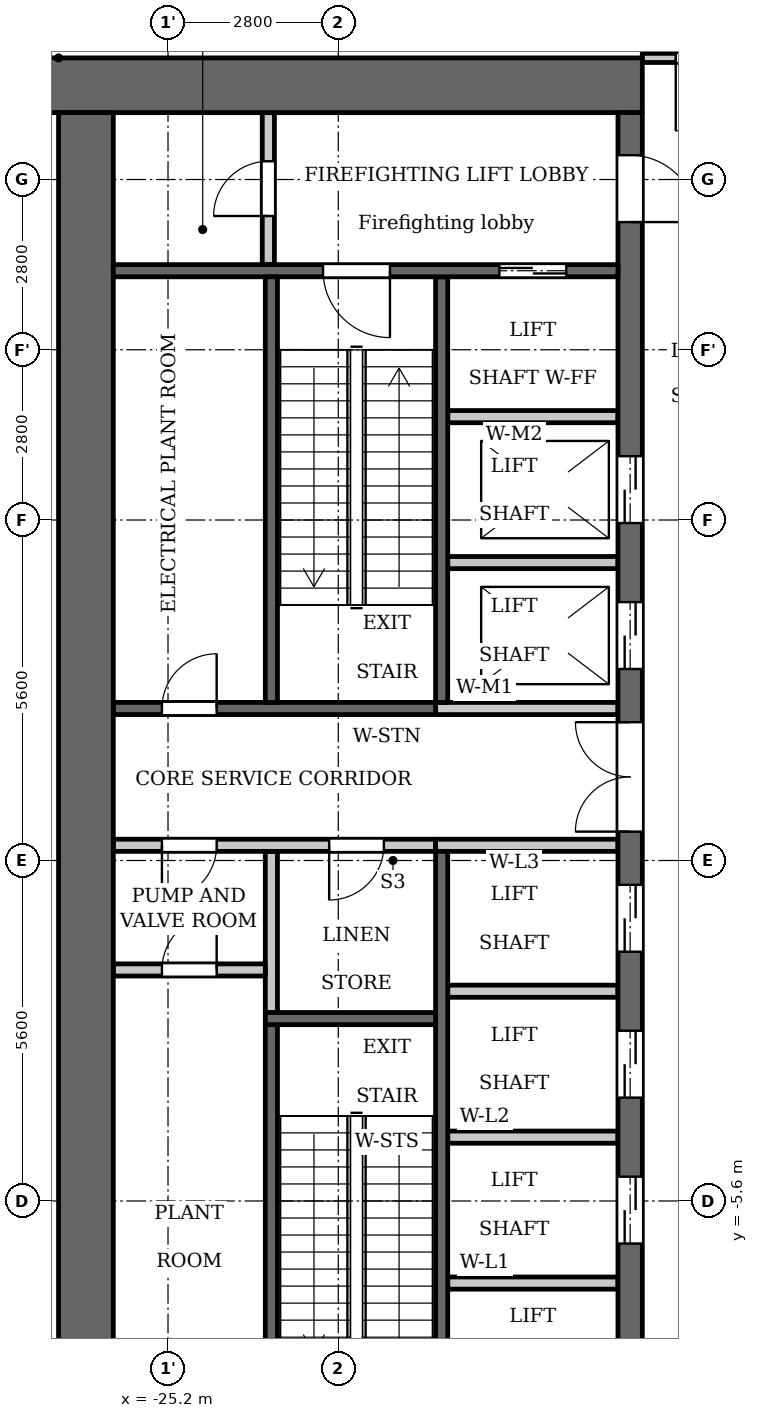
"""IFC4 building model, lengths in metres.
Left out: names, types, materials, properties, quantities, classifications, styles, units other than length and angle.
Written with IfcOpenShell. Run it as: python <this file> out.ifc"""

import sys

from ifc_helpers import new_model, si_unit, direction, frame, frame_2d, origin, place, context, subcontext, project, spatial, rectangle, extrude, element, fill, save


model = new_model("IFC4")
c1 = context("Model", 3, precision=1e-05, world=origin(), true_north=direction((0.0, 1.0)))
c2 = subcontext(c1, "Body", "Model", "MODEL_VIEW")
j1 = project(units=[si_unit("LENGTHUNIT", "METRE"), si_unit("PLANEANGLEUNIT", "RADIAN")], contexts=[c1])
p1 = place(None, origin())
s1 = spatial("IfcSite", under=j1, at=p1, CompositionType="ELEMENT")
p2 = place(p1, origin())
s2 = spatial("IfcBuilding", under=s1, at=p2, CompositionType="ELEMENT")
p3 = place(p2, frame((0.0, 0.0, 125.3)))
s3 = spatial("IfcBuildingStorey", under=s2, at=p3, CompositionType="ELEMENT", Elevation=125.3)
p4 = place(p3, frame((-23.5, -2.5, 0.0), z_axis=(0.0, 0.0, 1.0), x_axis=(0.0, 1.0, 0.0)))
e1 = element("IfcWall", 1, at=p4, inside=s3, PredefinedType="PARTITIONING", context=c2, shape_type="SweptSolid", body=[
    extrude(rectangle(XDim=2.65, YDim=0.2, at=frame_2d((1.325, 0.0))), origin(), (0.0, 0.0, 1.0), 4.95),
])
p5 = place(p3, frame((-20.7, 2.6, 0.0), z_axis=(0.0, 0.0, 1.0), x_axis=(0.0, 1.0, 0.0)))
e2 = element("IfcWall", 2, at=p5, inside=s3, PredefinedType="SHEAR", context=c2, shape_type="SweptSolid", body=[
    extrude(rectangle(XDim=7.0, YDim=0.2, at=frame_2d((3.5, 0.0))), origin(), (0.0, 0.0, 1.0), 4.95),
])
p6 = place(p3, frame((-20.7, -9.6, 0.0), z_axis=(0.0, 0.0, 1.0), x_axis=(0.0, 1.0, 0.0)))
e3 = element("IfcWall", 3, at=p6, inside=s3, PredefinedType="SHEAR", context=c2, shape_type="SweptSolid", body=[
    extrude(rectangle(XDim=9.75, YDim=0.2, at=frame_2d((4.875, 0.0))), origin(), (0.0, 0.0, 1.0), 4.95),
])
p7 = place(p3, frame((-20.8, 2.5, 0.0), z_axis=(0.0, 0.0, 1.0), x_axis=(-1.0, 0.0, 0.0)))
e4 = element("IfcWall", 4, at=p7, inside=s3, PredefinedType="SHEAR", context=c2, shape_type="SweptSolid", body=[
    extrude(rectangle(XDim=5.3, YDim=0.2, at=frame_2d((2.65, 0.0))), origin(), (0.0, 0.0, 1.0), 4.95),
])
p8 = place(p7, frame((3.6, 0.0, 0.0)))
e5 = element("IfcOpeningElement", 5, at=p8, cuts=e4, PredefinedType="OPENING", context=c2, shape_type="SweptSolid", body=[
    extrude(rectangle(XDim=0.9, YDim=2.1, at=frame_2d((0.45, 1.05))), frame((0.0, 0.11, 0.0), z_axis=(0.0, -1.0, 0.0), x_axis=(1.0, 0.0, 0.0)), (0.0, 0.0, 1.0), 0.22),
])
p9 = place(p3, frame((-20.8, 0.25, 0.0), z_axis=(0.0, 0.0, 1.0), x_axis=(-1.0, 0.0, 0.0)))
e6 = element("IfcWall", 6, at=p9, inside=s3, PredefinedType="PARTITIONING", context=c2, shape_type="SweptSolid", body=[
    extrude(rectangle(XDim=5.3, YDim=0.2, at=frame_2d((2.65, 0.0))), origin(), (0.0, 0.0, 1.0), 4.95),
])
p10 = place(p9, frame((0.85, 0.0, 0.0)))
e7 = element("IfcOpeningElement", 7, at=p10, cuts=e6, PredefinedType="OPENING", context=c2, shape_type="SweptSolid", body=[
    extrude(rectangle(XDim=0.9, YDim=2.1, at=frame_2d((0.45, 1.05))), frame((0.0, 0.11, 0.0), z_axis=(0.0, -1.0, 0.0), x_axis=(1.0, 0.0, 0.0)), (0.0, 0.0, 1.0), 0.22),
])
p11 = place(p9, frame((3.6, 0.0, 0.0)))
e8 = element("IfcOpeningElement", 8, at=p11, cuts=e6, PredefinedType="OPENING", context=c2, shape_type="SweptSolid", body=[
    extrude(rectangle(XDim=0.9, YDim=2.1, at=frame_2d((0.45, 1.05))), frame((0.0, 0.11, 0.0), z_axis=(0.0, -1.0, 0.0), x_axis=(1.0, 0.0, 0.0)), (0.0, 0.0, 1.0), 0.22),
])
p12 = place(p3, frame((-17.4, 12.75, 0.0), z_axis=(0.0, 0.0, 1.0), x_axis=(-1.0, 0.0, 0.0)))
e9 = element("IfcWall", 9, at=p12, inside=s3, PredefinedType="SHEAR", context=c2, shape_type="SweptSolid", body=[
    extrude(rectangle(XDim=10.4, YDim=0.9, at=frame_2d((5.2, 0.0))), origin(), (0.0, 0.0, 1.0), 4.95),
])
p13 = place(p3, frame((-17.6, -12.3, 0.0), z_axis=(0.0, 0.0, 1.0), x_axis=(0.0, 1.0, 0.0)))
e10 = element("IfcWall", 10, at=p13, inside=s3, PredefinedType="SHEAR", context=c2, shape_type="SweptSolid", body=[
    extrude(rectangle(XDim=24.6, YDim=0.4, at=frame_2d((12.3, 0.0))), origin(), (0.0, 0.0, 1.0), 4.95),
])
p14 = place(p13, frame((6.0, 0.0, 0.0)))
e11 = element("IfcOpeningElement", 11, at=p14, cuts=e10, PredefinedType="OPENING", context=c2, shape_type="SweptSolid", body=[
    extrude(rectangle(XDim=1.1, YDim=2.1, at=frame_2d((0.55, 1.05))), frame((0.0, 0.21, 0.0), z_axis=(0.0, -1.0, 0.0), x_axis=(1.0, 0.0, 0.0)), (0.0, 0.0, 1.0), 0.42),
])
p15 = place(p13, frame((8.4, 0.0, 0.0)))
e12 = element("IfcOpeningElement", 12, at=p15, cuts=e10, PredefinedType="OPENING", context=c2, shape_type="SweptSolid", body=[
    extrude(rectangle(XDim=1.1, YDim=2.1, at=frame_2d((0.55, 1.05))), frame((0.0, 0.21, 0.0), z_axis=(0.0, -1.0, 0.0), x_axis=(1.0, 0.0, 0.0)), (0.0, 0.0, 1.0), 0.42),
])
p16 = place(p13, frame((10.8, 0.0, 0.0)))
e13 = element("IfcOpeningElement", 13, at=p16, cuts=e10, PredefinedType="OPENING", context=c2, shape_type="SweptSolid", body=[
    extrude(rectangle(XDim=1.1, YDim=2.1, at=frame_2d((0.55, 1.05))), frame((0.0, 0.21, 0.0), z_axis=(0.0, -1.0, 0.0), x_axis=(1.0, 0.0, 0.0)), (0.0, 0.0, 1.0), 0.42),
])
p17 = place(p13, frame((15.45, 0.0, 0.0)))
e14 = element("IfcOpeningElement", 14, at=p17, cuts=e10, PredefinedType="OPENING", context=c2, shape_type="SweptSolid", body=[
    extrude(rectangle(XDim=1.1, YDim=2.1, at=frame_2d((0.55, 1.05))), frame((0.0, 0.21, 0.0), z_axis=(0.0, -1.0, 0.0), x_axis=(1.0, 0.0, 0.0)), (0.0, 0.0, 1.0), 0.42),
])
p18 = place(p13, frame((17.85, 0.0, 0.0)))
e15 = element("IfcOpeningElement", 15, at=p18, cuts=e10, PredefinedType="OPENING", context=c2, shape_type="SweptSolid", body=[
    extrude(rectangle(XDim=1.1, YDim=2.1, at=frame_2d((0.55, 1.05))), frame((0.0, 0.21, 0.0), z_axis=(0.0, -1.0, 0.0), x_axis=(1.0, 0.0, 0.0)), (0.0, 0.0, 1.0), 0.42),
])
p19 = place(p13, frame((22.8, 0.0, 0.0)))
e16 = element("IfcOpeningElement", 16, at=p19, cuts=e10, PredefinedType="OPENING", context=c2, shape_type="SweptSolid", body=[
    extrude(rectangle(XDim=1.1, YDim=2.1, at=frame_2d((0.55, 1.05))), frame((0.0, 0.21, 0.0), z_axis=(0.0, -1.0, 0.0), x_axis=(1.0, 0.0, 0.0)), (0.0, 0.0, 1.0), 0.42),
])
p20 = place(p13, frame((0.7, 0.0, 0.0)))
e17 = element("IfcOpeningElement", 17, at=p20, cuts=e10, PredefinedType="OPENING", context=c2, shape_type="SweptSolid", body=[
    extrude(rectangle(XDim=1.1, YDim=2.1, at=frame_2d((0.55, 1.05))), frame((0.0, 0.21, 0.0), z_axis=(0.0, -1.0, 0.0), x_axis=(1.0, 0.0, 0.0)), (0.0, 0.0, 1.0), 0.42),
])
p21 = place(p13, frame((12.775, 0.0, 0.0)))
e18 = element("IfcOpeningElement", 18, at=p21, cuts=e10, PredefinedType="OPENING", context=c2, shape_type="SweptSolid", body=[
    extrude(rectangle(XDim=1.8, YDim=2.1, at=frame_2d((0.9, 1.05))), frame((0.0, 0.21, 0.0), z_axis=(0.0, -1.0, 0.0), x_axis=(1.0, 0.0, 0.0)), (0.0, 0.0, 1.0), 0.42),
])
p22 = place(p3, frame((-26.55, -12.3, 0.0), z_axis=(0.0, 0.0, 1.0), x_axis=(0.0, 1.0, 0.0)))
e19 = element("IfcWall", 19, at=p22, inside=s3, PredefinedType="SHEAR", context=c2, shape_type="SweptSolid", body=[
    extrude(rectangle(XDim=24.6, YDim=0.9, at=frame_2d((12.3, 0.0))), origin(), (0.0, 0.0, 1.0), 4.95),
])
p23 = place(p3, frame((-23.55, 9.8, 0.0), z_axis=(0.0, 0.0, 1.0), x_axis=(0.0, 1.0, 0.0)))
e20 = element("IfcWall", 20, at=p23, inside=s3, PredefinedType="PARTITIONING", context=c2, shape_type="SweptSolid", body=[
    extrude(rectangle(XDim=2.5, YDim=0.2, at=frame_2d((1.25, 0.0))), origin(), (0.0, 0.0, 1.0), 4.95),
])
p24 = place(p23, frame((0.8, 0.0, 0.0)))
e21 = element("IfcOpeningElement", 21, at=p24, cuts=e20, PredefinedType="OPENING", context=c2, shape_type="SweptSolid", body=[
    extrude(rectangle(XDim=0.9, YDim=2.1, at=frame_2d((0.45, 1.05))), frame((0.0, 0.11, 0.0), z_axis=(0.0, -1.0, 0.0), x_axis=(1.0, 0.0, 0.0)), (0.0, 0.0, 1.0), 0.22),
])
p25 = place(p3, frame((-23.6, -1.8, 0.0), z_axis=(0.0, 0.0, 1.0), x_axis=(-1.0, 0.0, 0.0)))
e22 = element("IfcWall", 22, at=p25, inside=s3, PredefinedType="PARTITIONING", context=c2, shape_type="SweptSolid", body=[
    extrude(rectangle(XDim=2.5, YDim=0.2, at=frame_2d((1.25, 0.0))), origin(), (0.0, 0.0, 1.0), 4.95),
])
p26 = place(p25, frame((0.8, 0.0, 0.0)))
e23 = element("IfcOpeningElement", 23, at=p26, cuts=e22, PredefinedType="OPENING", context=c2, shape_type="SweptSolid", body=[
    extrude(rectangle(XDim=0.9, YDim=2.1, at=frame_2d((0.45, 1.05))), frame((0.0, 0.11, 0.0), z_axis=(0.0, -1.0, 0.0), x_axis=(1.0, 0.0, 0.0)), (0.0, 0.0, 1.0), 0.22),
])
for number, where, z_axis, x_axis in (
    (24, (-17.8, -6.95, 0.0), (0.0, 0.0, 1.0), (-1.0, 0.0, 0.0)),
    (25, (-17.8, -4.55, 0.0), (0.0, 0.0, 1.0), (-1.0, 0.0, 0.0)),
    (26, (-17.8, -2.15, 0.0), (0.0, 0.0, 1.0), (-1.0, 0.0, 0.0)),
):
    element("IfcWall", number, at=place(p3, frame(where, z_axis=z_axis, x_axis=x_axis)), inside=s3, PredefinedType="PARTITIONING", context=c2, shape_type="SweptSolid", body=[
        extrude(rectangle(XDim=2.8, YDim=0.2, at=frame_2d((1.4, 0.0))), origin(), (0.0, 0.0, 1.0), 4.95),
    ])
for number, where, z_axis, x_axis in (
    (27, (-17.8, 0.25, 0.0), (0.0, 0.0, 1.0), (-1.0, 0.0, 0.0)),
    (28, (-17.8, 2.5, 0.0), (0.0, 0.0, 1.0), (-1.0, 0.0, 0.0)),
):
    element("IfcWall", number, at=place(p3, frame(where, z_axis=z_axis, x_axis=x_axis)), inside=s3, PredefinedType="PARTITIONING", context=c2, shape_type="SweptSolid", body=[
        extrude(rectangle(XDim=3.0, YDim=0.2, at=frame_2d((1.5, 0.0))), origin(), (0.0, 0.0, 1.0), 4.95),
    ])
for number, where, z_axis, x_axis in (
    (29, (-17.8, 4.9, 0.0), (0.0, 0.0, 1.0), (-1.0, 0.0, 0.0)),
    (30, (-17.8, 7.3, 0.0), (0.0, 0.0, 1.0), (-1.0, 0.0, 0.0)),
):
    element("IfcWall", number, at=place(p3, frame(where, z_axis=z_axis, x_axis=x_axis)), inside=s3, PredefinedType="PARTITIONING", context=c2, shape_type="SweptSolid", body=[
        extrude(rectangle(XDim=2.8, YDim=0.2, at=frame_2d((1.4, 0.0))), origin(), (0.0, 0.0, 1.0), 4.95),
    ])
p27 = place(p3, frame((-17.8, 9.7, 0.0), z_axis=(0.0, 0.0, 1.0), x_axis=(-1.0, 0.0, 0.0)))
e31 = element("IfcWall", 31, at=p27, inside=s3, PredefinedType="SHEAR", context=c2, shape_type="SweptSolid", body=[
    extrude(rectangle(XDim=8.3, YDim=0.2, at=frame_2d((4.15, 0.0))), origin(), (0.0, 0.0, 1.0), 4.95),
])
p28 = place(p27, frame((0.85, 0.0, 0.0)))
e32 = element("IfcOpeningElement", 32, at=p28, cuts=e31, PredefinedType="OPENING", context=c2, shape_type="SweptSolid", body=[
    extrude(rectangle(XDim=1.1, YDim=2.1, at=frame_2d((0.55, 1.05))), frame((0.0, 0.11, 0.0), z_axis=(0.0, -1.0, 0.0), x_axis=(1.0, 0.0, 0.0)), (0.0, 0.0, 1.0), 0.22),
])
p29 = place(p27, frame((3.75, 0.0, 0.0)))
e33 = element("IfcOpeningElement", 33, at=p29, cuts=e31, PredefinedType="OPENING", context=c2, shape_type="SweptSolid", body=[
    extrude(rectangle(XDim=1.1, YDim=2.1, at=frame_2d((0.55, 1.05))), frame((0.0, 0.11, 0.0), z_axis=(0.0, -1.0, 0.0), x_axis=(1.0, 0.0, 0.0)), (0.0, 0.0, 1.0), 0.22),
])
p30 = place(p3, frame((-23.5, 2.6, 0.0), z_axis=(0.0, 0.0, 1.0), x_axis=(0.0, 1.0, 0.0)))
e34 = element("IfcWall", 34, at=p30, inside=s3, PredefinedType="SHEAR", context=c2, shape_type="SweptSolid", body=[
    extrude(rectangle(XDim=7.0, YDim=0.2, at=frame_2d((3.5, 0.0))), origin(), (0.0, 0.0, 1.0), 4.95),
])
p31 = place(p3, frame((-23.5, -9.6, 0.0), z_axis=(0.0, 0.0, 1.0), x_axis=(0.0, 1.0, 0.0)))
e35 = element("IfcWall", 35, at=p31, inside=s3, PredefinedType="SHEAR", context=c2, shape_type="SweptSolid", body=[
    extrude(rectangle(XDim=6.9, YDim=0.2, at=frame_2d((3.45, 0.0))), origin(), (0.0, 0.0, 1.0), 4.95),
])
p32 = place(p3, frame((-20.8, -2.6, 0.0), z_axis=(0.0, 0.0, 1.0), x_axis=(-1.0, 0.0, 0.0)))
e36 = element("IfcWall", 36, at=p32, inside=s3, PredefinedType="SHEAR", context=c2, shape_type="SweptSolid", body=[
    extrude(rectangle(XDim=2.8, YDim=0.2, at=frame_2d((1.4, 0.0))), origin(), (0.0, 0.0, 1.0), 4.95),
])
p33 = place(p3, frame((-17.4, 13.2, 0.0), z_axis=(0.0, 0.0, 1.0), x_axis=(1.0, 0.0, 0.0)))
e37 = element("IfcWall", 37, at=p33, inside=s3, PredefinedType="PARTITIONING", context=c2, shape_type="SweptSolid", body=[
    extrude(rectangle(XDim=6.016, YDim=0.15, at=frame_2d((3.008, 0.0))), origin(), (0.0, 0.0, 1.0), 4.95),
])
p34 = place(p33, frame((0.55, 0.0, 0.0)))
e38 = element("IfcOpeningElement", 38, at=p34, cuts=e37, PredefinedType="OPENING", context=c2, shape_type="SweptSolid", body=[
    extrude(rectangle(XDim=1.2, YDim=2.1, at=frame_2d((0.6, 1.05))), frame((0.0, 0.085, 0.0), z_axis=(0.0, -1.0, 0.0), x_axis=(1.0, 0.0, 0.0)), (0.0, 0.0, 1.0), 0.17),
])
p35 = place(p33, frame((4.7, 0.0, 0.0)))
e39 = element("IfcOpeningElement", 39, at=p35, cuts=e37, PredefinedType="OPENING", context=c2, shape_type="SweptSolid", body=[
    extrude(rectangle(XDim=0.9, YDim=2.1, at=frame_2d((0.45, 1.05))), frame((0.0, 0.085, 0.0), z_axis=(0.0, -1.0, 0.0), x_axis=(1.0, 0.0, 0.0)), (0.0, 0.0, 1.0), 0.17),
])
p36 = place(p33, frame((2.8, 0.0, 0.0)))
e40 = element("IfcOpeningElement", 40, at=p36, cuts=e37, PredefinedType="OPENING", context=c2, shape_type="SweptSolid", body=[
    extrude(rectangle(XDim=0.9, YDim=2.1, at=frame_2d((0.45, 1.05))), frame((0.0, 0.085, 0.0), z_axis=(0.0, -1.0, 0.0), x_axis=(1.0, 0.0, 0.0)), (0.0, 0.0, 1.0), 0.17),
])
p37 = place(p14, origin())
e41 = element("IfcDoor", 41, at=p37, inside=s3, OperationType="DOUBLE_DOOR_SLIDING", PredefinedType="DOOR", context=c2, shape_type="SweptSolid", body=[
    extrude(rectangle(XDim=1.1, YDim=2.1, at=frame_2d((0.55, 1.05))), frame((0.0, 0.025, 0.0), z_axis=(0.0, -1.0, 0.0), x_axis=(1.0, 0.0, 0.0)), (0.0, 0.0, 1.0), 0.05),
])
fill(e11, e41)
p38 = place(p15, origin())
e42 = element("IfcDoor", 42, at=p38, inside=s3, OperationType="DOUBLE_DOOR_SLIDING", PredefinedType="DOOR", context=c2, shape_type="SweptSolid", body=[
    extrude(rectangle(XDim=1.1, YDim=2.1, at=frame_2d((0.55, 1.05))), frame((0.0, 0.025, 0.0), z_axis=(0.0, -1.0, 0.0), x_axis=(1.0, 0.0, 0.0)), (0.0, 0.0, 1.0), 0.05),
])
fill(e12, e42)
p39 = place(p16, origin())
e43 = element("IfcDoor", 43, at=p39, inside=s3, OperationType="DOUBLE_DOOR_SLIDING", PredefinedType="DOOR", context=c2, shape_type="SweptSolid", body=[
    extrude(rectangle(XDim=1.1, YDim=2.1, at=frame_2d((0.55, 1.05))), frame((0.0, 0.025, 0.0), z_axis=(0.0, -1.0, 0.0), x_axis=(1.0, 0.0, 0.0)), (0.0, 0.0, 1.0), 0.05),
])
fill(e13, e43)
p40 = place(p17, origin())
e44 = element("IfcDoor", 44, at=p40, inside=s3, OperationType="DOUBLE_DOOR_SLIDING", PredefinedType="DOOR", context=c2, shape_type="SweptSolid", body=[
    extrude(rectangle(XDim=1.1, YDim=2.1, at=frame_2d((0.55, 1.05))), frame((0.0, 0.025, 0.0), z_axis=(0.0, -1.0, 0.0), x_axis=(1.0, 0.0, 0.0)), (0.0, 0.0, 1.0), 0.05),
])
fill(e14, e44)
p41 = place(p18, origin())
e45 = element("IfcDoor", 45, at=p41, inside=s3, OperationType="DOUBLE_DOOR_SLIDING", PredefinedType="DOOR", context=c2, shape_type="SweptSolid", body=[
    extrude(rectangle(XDim=1.1, YDim=2.1, at=frame_2d((0.55, 1.05))), frame((0.0, 0.025, 0.0), z_axis=(0.0, -1.0, 0.0), x_axis=(1.0, 0.0, 0.0)), (0.0, 0.0, 1.0), 0.05),
])
fill(e15, e45)
p42 = place(p28, origin())
e46 = element("IfcDoor", 46, at=p42, inside=s3, OperationType="DOUBLE_DOOR_SLIDING", PredefinedType="DOOR", context=c2, shape_type="SweptSolid", body=[
    extrude(rectangle(XDim=1.1, YDim=2.1, at=frame_2d((0.55, 1.05))), frame((0.0, 0.025, 0.0), z_axis=(0.0, -1.0, 0.0), x_axis=(1.0, 0.0, 0.0)), (0.0, 0.0, 1.0), 0.05),
])
fill(e32, e46)
p43 = place(p19, origin())
e47 = element("IfcDoor", 47, at=p43, inside=s3, OperationType="SINGLE_SWING_LEFT", PredefinedType="DOOR", context=c2, shape_type="SweptSolid", body=[
    extrude(rectangle(XDim=1.1, YDim=2.1, at=frame_2d((0.55, 1.05))), frame((0.0, 0.025, 0.0), z_axis=(0.0, -1.0, 0.0), x_axis=(1.0, 0.0, 0.0)), (0.0, 0.0, 1.0), 0.05),
])
fill(e16, e47)
p44 = place(p24, origin())
e48 = element("IfcDoor", 48, at=p44, inside=s3, OperationType="SINGLE_SWING_RIGHT", PredefinedType="DOOR", context=c2, shape_type="SweptSolid", body=[
    extrude(rectangle(XDim=0.9, YDim=2.1, at=frame_2d((0.45, 1.05))), frame((0.0, 0.025, 0.0), z_axis=(0.0, -1.0, 0.0), x_axis=(1.0, 0.0, 0.0)), (0.0, 0.0, 1.0), 0.05),
])
fill(e21, e48)
p45 = place(p29, origin())
e49 = element("IfcDoor", 49, at=p45, inside=s3, OperationType="SINGLE_SWING_RIGHT", PredefinedType="DOOR", context=c2, shape_type="SweptSolid", body=[
    extrude(rectangle(XDim=1.1, YDim=2.1, at=frame_2d((0.55, 1.05))), frame((0.0, 0.025, 0.0), z_axis=(0.0, -1.0, 0.0), x_axis=(1.0, 0.0, 0.0)), (0.0, 0.0, 1.0), 0.05),
])
fill(e33, e49)
p46 = place(p21, origin())
e50 = element("IfcDoor", 50, at=p46, inside=s3, OperationType="DOUBLE_DOOR_SINGLE_SWING", PredefinedType="DOOR", context=c2, shape_type="SweptSolid", body=[
    extrude(rectangle(XDim=1.8, YDim=2.1, at=frame_2d((0.9, 1.05))), frame((0.0, 0.025, 0.0), z_axis=(0.0, -1.0, 0.0), x_axis=(1.0, 0.0, 0.0)), (0.0, 0.0, 1.0), 0.05),
])
fill(e18, e50)
p47 = place(p10, origin())
e51 = element("IfcDoor", 51, at=p47, inside=s3, OperationType="SINGLE_SWING_LEFT", PredefinedType="DOOR", context=c2, shape_type="SweptSolid", body=[
    extrude(rectangle(XDim=0.9, YDim=2.1, at=frame_2d((0.45, 1.05))), frame((0.0, 0.025, 0.0), z_axis=(0.0, -1.0, 0.0), x_axis=(1.0, 0.0, 0.0)), (0.0, 0.0, 1.0), 0.05),
])
fill(e7, e51)
p48 = place(p26, origin())
e52 = element("IfcDoor", 52, at=p48, inside=s3, OperationType="SINGLE_SWING_LEFT", PredefinedType="DOOR", context=c2, shape_type="SweptSolid", body=[
    extrude(rectangle(XDim=0.9, YDim=2.1, at=frame_2d((0.45, 1.05))), frame((0.0, 0.025, 0.0), z_axis=(0.0, -1.0, 0.0), x_axis=(1.0, 0.0, 0.0)), (0.0, 0.0, 1.0), 0.05),
])
fill(e23, e52)
p49 = place(p11, origin())
e53 = element("IfcDoor", 53, at=p49, inside=s3, OperationType="SINGLE_SWING_LEFT", PredefinedType="DOOR", context=c2, shape_type="SweptSolid", body=[
    extrude(rectangle(XDim=0.9, YDim=2.1, at=frame_2d((0.45, 1.05))), frame((0.0, 0.025, 0.0), z_axis=(0.0, -1.0, 0.0), x_axis=(1.0, 0.0, 0.0)), (0.0, 0.0, 1.0), 0.05),
])
fill(e8, e53)
p50 = place(p8, origin())
e54 = element("IfcDoor", 54, at=p50, inside=s3, OperationType="SINGLE_SWING_LEFT", PredefinedType="DOOR", context=c2, shape_type="SweptSolid", body=[
    extrude(rectangle(XDim=0.9, YDim=2.1, at=frame_2d((0.45, 1.05))), frame((0.0, 0.025, 0.0), z_axis=(0.0, -1.0, 0.0), x_axis=(1.0, 0.0, 0.0)), (0.0, 0.0, 1.0), 0.05),
])
fill(e5, e54)
p51 = place(p34, origin())
e55 = element("IfcDoor", 55, at=p51, inside=s3, OperationType="SINGLE_SWING_LEFT", PredefinedType="DOOR", context=c2, shape_type="SweptSolid", body=[
    extrude(rectangle(XDim=1.2, YDim=2.1, at=frame_2d((0.6, 1.05))), frame((0.0, 0.025, 0.0), z_axis=(0.0, -1.0, 0.0), x_axis=(1.0, 0.0, 0.0)), (0.0, 0.0, 1.0), 0.05),
])
fill(e38, e55)
save(model, sys.argv[1])
